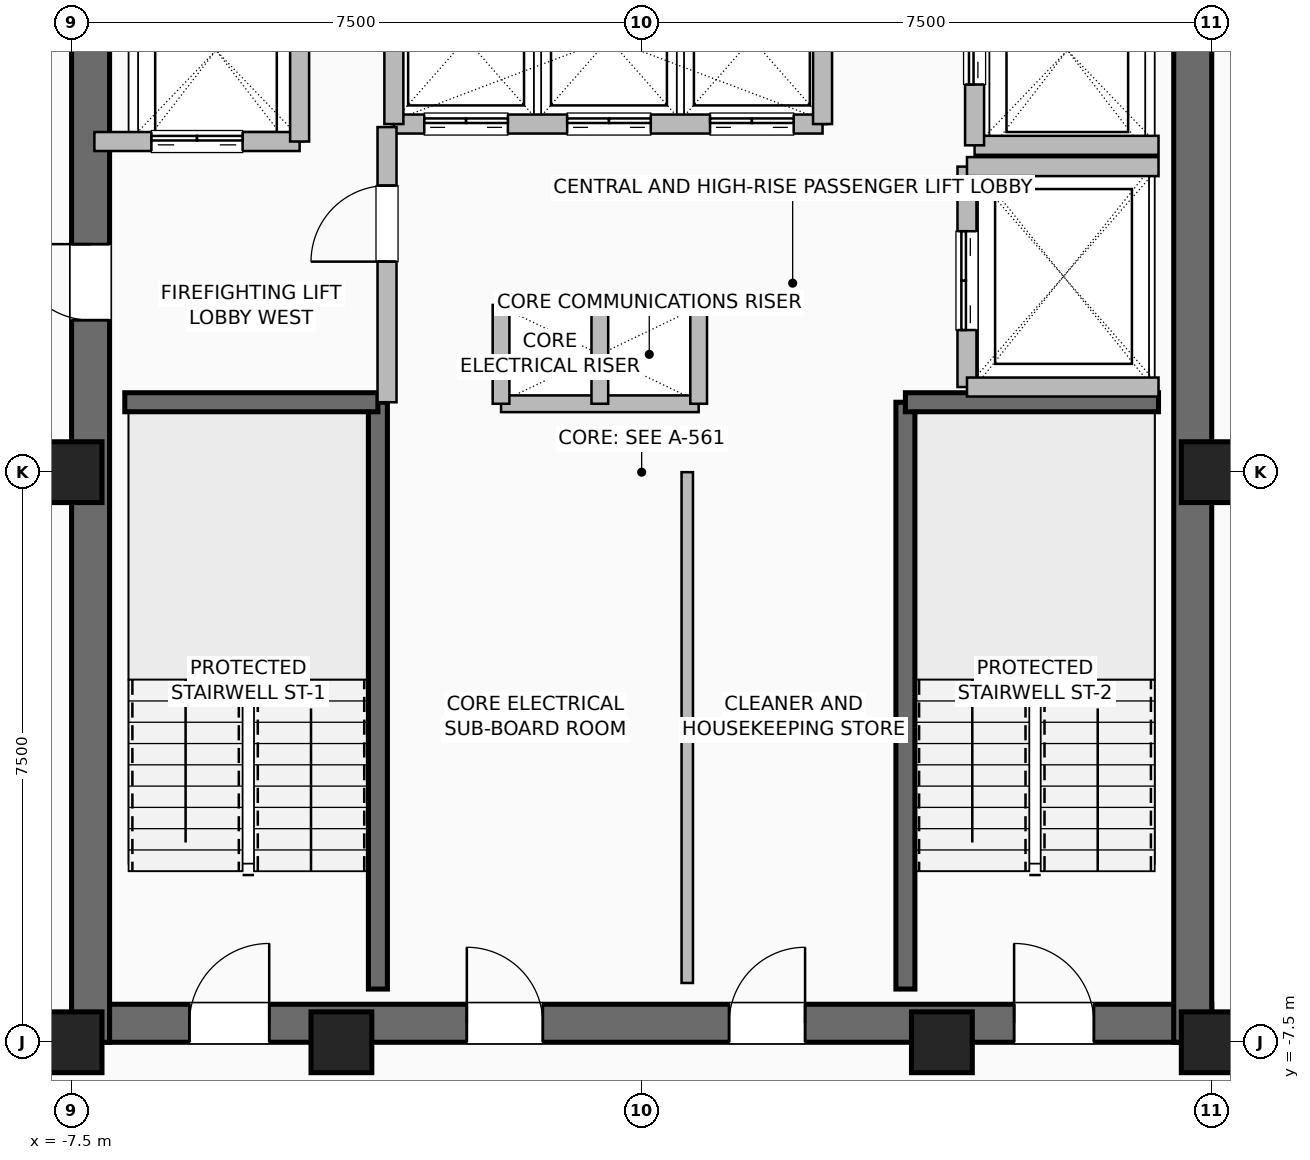
"""IFC4 building model, lengths in metres.
Left out: names, types, materials, properties, quantities, classifications, styles, units other than length and angle.
Written with IfcOpenShell. Run it as: python <this file> out.ifc"""

import sys

from ifc_helpers import new_model, si_unit, direction, frame, frame_2d, origin, origin_2d, place, context, subcontext, project, spatial, rectangle, hollow_rectangle, extrude, element, fill, save


model = new_model("IFC4")
c1 = context("Model", 3, precision=1e-05, world=origin(), true_north=direction((0.0, 1.0)))
c2 = subcontext(c1, "Body", "Model", "MODEL_VIEW")
j1 = project(units=[si_unit("LENGTHUNIT", "METRE"), si_unit("PLANEANGLEUNIT", "RADIAN")], contexts=[c1])
p1 = place(None, origin())
s1 = spatial("IfcSite", under=j1, at=p1, CompositionType="ELEMENT")
p2 = place(p1, origin())
s2 = spatial("IfcBuilding", under=s1, at=p2, CompositionType="ELEMENT")
p3 = place(p2, frame((0.0, 0.0, 246.8)))
s3 = spatial("IfcBuildingStorey", under=s2, at=p3, CompositionType="ELEMENT", Elevation=246.8)
for number, where, z_axis, x_axis in (
    (1, (-7.5, -7.5, 0.0), (0.0, 0.0, 1.0), (1.0, 0.0, 0.0)),
    (2, (-3.95, -7.5, 0.0), (0.0, 0.0, 1.0), (1.0, 0.0, 0.0)),
    (3, (3.95, -7.5, 0.0), (0.0, 0.0, 1.0), (1.0, 0.0, 0.0)),
    (4, (7.5, -7.5, 0.0), (0.0, 0.0, 1.0), (1.0, 0.0, 0.0)),
    (5, (7.5, 0.0, 0.0), (0.0, 0.0, 1.0), (1.0, 0.0, 0.0)),
    (6, (-7.5, 0.0, 0.0), (0.0, 0.0, 1.0), (1.0, 0.0, 0.0)),
):
    element("IfcColumn", number, at=place(p3, frame(where, z_axis=z_axis, x_axis=x_axis)), inside=s3, PredefinedType="COLUMN", context=c2, shape_type="SweptSolid", body=[
        extrude(hollow_rectangle(XDim=0.8, YDim=0.8, WallThickness=0.04, at=origin_2d()), origin(), (0.0, 0.0, 1.0), 3.6),
    ])
p4 = place(p3, frame((-7.5, -7.25, 0.0), z_axis=(0.0, 0.0, 1.0), x_axis=(1.0, 0.0, 0.0)))
e7 = element("IfcWall", 7, at=p4, inside=s3, PredefinedType="SHEAR", context=c2, shape_type="SweptSolid", body=[
    extrude(rectangle(XDim=15.0, YDim=0.5, at=frame_2d((7.5, 0.0))), origin(), (0.0, 0.0, 1.0), 3.36),
])
p5 = place(p4, frame((1.55, 0.0, 0.0)))
e8 = element("IfcOpeningElement", 8, at=p5, cuts=e7, PredefinedType="OPENING", context=c2, shape_type="SweptSolid", body=[
    extrude(rectangle(XDim=1.05, YDim=2.08, at=frame_2d((0.525, 1.04))), frame((0.0, 0.26, 0.0), z_axis=(0.0, -1.0, 0.0), x_axis=(1.0, 0.0, 0.0)), (0.0, 0.0, 1.0), 0.52),
])
p6 = place(p4, frame((12.4, 0.0, 0.0)))
e9 = element("IfcOpeningElement", 9, at=p6, cuts=e7, PredefinedType="OPENING", context=c2, shape_type="SweptSolid", body=[
    extrude(rectangle(XDim=1.05, YDim=2.08, at=frame_2d((0.525, 1.04))), frame((0.0, 0.26, 0.0), z_axis=(0.0, -1.0, 0.0), x_axis=(1.0, 0.0, 0.0)), (0.0, 0.0, 1.0), 0.52),
])
p7 = place(p4, frame((5.2, 0.0, 0.0)))
e10 = element("IfcOpeningElement", 10, at=p7, cuts=e7, PredefinedType="OPENING", context=c2, shape_type="SweptSolid", body=[
    extrude(rectangle(XDim=1.0, YDim=2.08, at=frame_2d((0.5, 1.04))), frame((0.0, 0.26, 0.0), z_axis=(0.0, -1.0, 0.0), x_axis=(1.0, 0.0, 0.0)), (0.0, 0.0, 1.0), 0.52),
])
p8 = place(p4, frame((8.65, 0.0, 0.0)))
e11 = element("IfcOpeningElement", 11, at=p8, cuts=e7, PredefinedType="OPENING", context=c2, shape_type="SweptSolid", body=[
    extrude(rectangle(XDim=1.0, YDim=2.08, at=frame_2d((0.5, 1.04))), frame((0.0, 0.26, 0.0), z_axis=(0.0, -1.0, 0.0), x_axis=(1.0, 0.0, 0.0)), (0.0, 0.0, 1.0), 0.52),
])
p9 = place(p3, frame((-7.25, -7.5, 0.0), z_axis=(0.0, 0.0, 1.0), x_axis=(0.0, 1.0, 0.0)))
e12 = element("IfcWall", 12, at=p9, inside=s3, PredefinedType="SHEAR", context=c2, shape_type="SweptSolid", body=[
    extrude(rectangle(XDim=15.0, YDim=0.5, at=frame_2d((7.5, 0.0))), origin(), (0.0, 0.0, 1.0), 3.36),
])
p10 = place(p9, frame((9.5, 0.0, 0.0)))
e13 = element("IfcOpeningElement", 13, at=p10, cuts=e12, PredefinedType="OPENING", context=c2, shape_type="SweptSolid", body=[
    extrude(rectangle(XDim=1.0, YDim=2.08, at=frame_2d((0.5, 1.04))), frame((0.0, 0.26, 0.0), z_axis=(0.0, -1.0, 0.0), x_axis=(1.0, 0.0, 0.0)), (0.0, 0.0, 1.0), 0.52),
])
p11 = place(p3, frame((7.25, -7.5, 0.0), z_axis=(0.0, 0.0, 1.0), x_axis=(0.0, 1.0, 0.0)))
e14 = element("IfcWall", 14, at=p11, inside=s3, PredefinedType="SHEAR", context=c2, shape_type="SweptSolid", body=[
    extrude(rectangle(XDim=15.0, YDim=0.5, at=frame_2d((7.5, 0.0))), origin(), (0.0, 0.0, 1.0), 3.36),
])
p12 = place(p3, frame((-3.47, -6.8, 0.0), z_axis=(0.0, 0.0, 1.0), x_axis=(0.0, 1.0, 0.0)))
e15 = element("IfcWall", 15, at=p12, inside=s3, PredefinedType="SHEAR", context=c2, shape_type="SweptSolid", body=[
    extrude(rectangle(XDim=7.72, YDim=0.25, at=frame_2d((3.86, 0.0))), origin(), (0.0, 0.0, 1.0), 3.36),
])
p13 = place(p3, frame((-6.8, 0.92, 0.0), z_axis=(0.0, 0.0, 1.0), x_axis=(1.0, 0.0, 0.0)))
e16 = element("IfcWall", 16, at=p13, inside=s3, PredefinedType="SHEAR", context=c2, shape_type="SweptSolid", body=[
    extrude(rectangle(XDim=3.33, YDim=0.25, at=frame_2d((1.665, 0.0))), origin(), (0.0, 0.0, 1.0), 3.36),
])
p14 = place(p3, frame((3.47, -6.8, 0.0), z_axis=(0.0, 0.0, 1.0), x_axis=(0.0, 1.0, 0.0)))
e17 = element("IfcWall", 17, at=p14, inside=s3, PredefinedType="SHEAR", context=c2, shape_type="SweptSolid", body=[
    extrude(rectangle(XDim=7.72, YDim=0.25, at=frame_2d((3.86, 0.0))), origin(), (0.0, 0.0, 1.0), 3.36),
])
p15 = place(p3, frame((3.47, 0.92, 0.0), z_axis=(0.0, 0.0, 1.0), x_axis=(1.0, 0.0, 0.0)))
e18 = element("IfcWall", 18, at=p15, inside=s3, PredefinedType="SHEAR", context=c2, shape_type="SweptSolid", body=[
    extrude(rectangle(XDim=3.33, YDim=0.25, at=frame_2d((1.665, 0.0))), origin(), (0.0, 0.0, 1.0), 3.36),
])
for number, where, z_axis, x_axis in (
    (19, (-1.85, 2.2, 0.0), (0.0, 0.0, 1.0), (1.0, 0.0, 0.0)),
    (20, (-1.85, 0.9, 0.0), (0.0, 0.0, 1.0), (1.0, 0.0, 0.0)),
):
    element("IfcWall", number, at=place(p3, frame(where, z_axis=z_axis, x_axis=x_axis)), inside=s3, PredefinedType="PARTITIONING", context=c2, shape_type="SweptSolid", body=[
        extrude(rectangle(XDim=2.6, YDim=0.22, at=frame_2d((1.3, 0.0))), origin(), (0.0, 0.0, 1.0), 3.36),
    ])
for number, where, z_axis, x_axis in (
    (21, (-0.55, 0.9, 0.0), (0.0, 0.0, 1.0), (0.0, 1.0, 0.0)),
    (22, (0.75, 0.9, 0.0), (0.0, 0.0, 1.0), (0.0, 1.0, 0.0)),
    (23, (-1.85, 0.9, 0.0), (0.0, 0.0, 1.0), (0.0, 1.0, 0.0)),
):
    element("IfcWall", number, at=place(p3, frame(where, z_axis=z_axis, x_axis=x_axis)), inside=s3, PredefinedType="PARTITIONING", context=c2, shape_type="SweptSolid", body=[
        extrude(rectangle(XDim=1.3, YDim=0.22, at=frame_2d((0.65, 0.0))), origin(), (0.0, 0.0, 1.0), 3.36),
    ])
p16 = place(p3, frame((-3.26, 4.58, 0.0), z_axis=(0.0, 0.0, 1.0), x_axis=(1.0, 0.0, 0.0)))
e24 = element("IfcWall", 24, at=p16, inside=s3, PredefinedType="SHEAR", context=c2, shape_type="SweptSolid", body=[
    extrude(rectangle(XDim=5.64, YDim=0.25, at=frame_2d((2.82, 0.0))), origin(), (0.0, 0.0, 1.0), 3.36),
])
p17 = place(p16, frame((0.4, 0.0, 0.0)))
e25 = element("IfcOpeningElement", 25, at=p17, cuts=e24, PredefinedType="OPENING", context=c2, shape_type="SweptSolid", body=[
    extrude(rectangle(XDim=1.1, YDim=2.2, at=frame_2d((0.55, 1.1))), frame((0.0, 0.135, 0.0), z_axis=(0.0, -1.0, 0.0), x_axis=(1.0, 0.0, 0.0)), (0.0, 0.0, 1.0), 0.27),
])
p18 = place(p16, frame((2.28, 0.0, 0.0)))
e26 = element("IfcOpeningElement", 26, at=p18, cuts=e24, PredefinedType="OPENING", context=c2, shape_type="SweptSolid", body=[
    extrude(rectangle(XDim=1.1, YDim=2.2, at=frame_2d((0.55, 1.1))), frame((0.0, 0.135, 0.0), z_axis=(0.0, -1.0, 0.0), x_axis=(1.0, 0.0, 0.0)), (0.0, 0.0, 1.0), 0.27),
])
p19 = place(p16, frame((4.16, 0.0, 0.0)))
e27 = element("IfcOpeningElement", 27, at=p19, cuts=e24, PredefinedType="OPENING", context=c2, shape_type="SweptSolid", body=[
    extrude(rectangle(XDim=1.1, YDim=2.2, at=frame_2d((0.55, 1.1))), frame((0.0, 0.135, 0.0), z_axis=(0.0, -1.0, 0.0), x_axis=(1.0, 0.0, 0.0)), (0.0, 0.0, 1.0), 0.27),
])
for number, where, z_axis, x_axis in (
    (28, (-3.26, 4.58, 0.0), (0.0, 0.0, 1.0), (0.0, 1.0, 0.0)),
    (29, (2.38, 4.58, 0.0), (0.0, 0.0, 1.0), (0.0, 1.0, 0.0)),
):
    element("IfcWall", number, at=place(p3, frame(where, z_axis=z_axis, x_axis=x_axis)), inside=s3, PredefinedType="SHEAR", context=c2, shape_type="SweptSolid", body=[
        extrude(rectangle(XDim=2.22, YDim=0.25, at=frame_2d((1.11, 0.0))), origin(), (0.0, 0.0, 1.0), 3.36),
    ])
p20 = place(p3, frame((-7.2, 4.35, 0.0), z_axis=(0.0, 0.0, 1.0), x_axis=(1.0, 0.0, 0.0)))
e30 = element("IfcWall", 30, at=p20, inside=s3, PredefinedType="SHEAR", context=c2, shape_type="SweptSolid", body=[
    extrude(rectangle(XDim=2.7, YDim=0.25, at=frame_2d((1.35, 0.0))), origin(), (0.0, 0.0, 1.0), 3.36),
])
p21 = place(p20, frame((0.75, 0.0, 0.0)))
e31 = element("IfcOpeningElement", 31, at=p21, cuts=e30, PredefinedType="OPENING", context=c2, shape_type="SweptSolid", body=[
    extrude(rectangle(XDim=1.2, YDim=2.2, at=frame_2d((0.6, 1.1))), frame((0.0, 0.135, 0.0), z_axis=(0.0, -1.0, 0.0), x_axis=(1.0, 0.0, 0.0)), (0.0, 0.0, 1.0), 0.27),
])
p22 = place(p3, frame((-4.5, 4.35, 0.0), z_axis=(0.0, 0.0, 1.0), x_axis=(0.0, 1.0, 0.0)))
e32 = element("IfcWall", 32, at=p22, inside=s3, PredefinedType="SHEAR", context=c2, shape_type="SweptSolid", body=[
    extrude(rectangle(XDim=2.85, YDim=0.25, at=frame_2d((1.425, 0.0))), origin(), (0.0, 0.0, 1.0), 3.36),
])
p23 = place(p3, frame((4.38, 4.3, 0.0), z_axis=(0.0, 0.0, 1.0), x_axis=(1.0, 0.0, 0.0)))
e33 = element("IfcWall", 33, at=p23, inside=s3, PredefinedType="SHEAR", context=c2, shape_type="SweptSolid", body=[
    extrude(rectangle(XDim=2.42, YDim=0.25, at=frame_2d((1.21, 0.0))), origin(), (0.0, 0.0, 1.0), 3.36),
])
p24 = place(p3, frame((4.38, 4.3, 0.0), z_axis=(0.0, 0.0, 1.0), x_axis=(0.0, 1.0, 0.0)))
e34 = element("IfcWall", 34, at=p24, inside=s3, PredefinedType="SHEAR", context=c2, shape_type="SweptSolid", body=[
    extrude(rectangle(XDim=2.5, YDim=0.25, at=frame_2d((1.25, 0.0))), origin(), (0.0, 0.0, 1.0), 3.36),
])
p25 = place(p24, frame((0.8, 0.0, 0.0)))
e35 = element("IfcOpeningElement", 35, at=p25, cuts=e34, PredefinedType="OPENING", context=c2, shape_type="SweptSolid", body=[
    extrude(rectangle(XDim=1.2, YDim=2.2, at=frame_2d((0.6, 1.1))), frame((0.0, 0.135, 0.0), z_axis=(0.0, -1.0, 0.0), x_axis=(1.0, 0.0, 0.0)), (0.0, 0.0, 1.0), 0.27),
])
p26 = place(p3, frame((4.28, 1.12, 0.0), z_axis=(0.0, 0.0, 1.0), x_axis=(0.0, 1.0, 0.0)))
e36 = element("IfcWall", 36, at=p26, inside=s3, PredefinedType="SHEAR", context=c2, shape_type="SweptSolid", body=[
    extrude(rectangle(XDim=2.9, YDim=0.25, at=frame_2d((1.45, 0.0))), origin(), (0.0, 0.0, 1.0), 3.36),
])
p27 = place(p26, frame((0.75, 0.0, 0.0)))
e37 = element("IfcOpeningElement", 37, at=p27, cuts=e36, PredefinedType="OPENING", context=c2, shape_type="SweptSolid", body=[
    extrude(rectangle(XDim=1.3, YDim=2.3, at=frame_2d((0.65, 1.15))), frame((0.0, 0.135, 0.0), z_axis=(0.0, -1.0, 0.0), x_axis=(1.0, 0.0, 0.0)), (0.0, 0.0, 1.0), 0.27),
])
for number, where, z_axis, x_axis in (
    (38, (4.28, 1.12, 0.0), (0.0, 0.0, 1.0), (1.0, 0.0, 0.0)),
    (39, (4.28, 4.02, 0.0), (0.0, 0.0, 1.0), (1.0, 0.0, 0.0)),
):
    element("IfcWall", number, at=place(p3, frame(where, z_axis=z_axis, x_axis=x_axis)), inside=s3, PredefinedType="SHEAR", context=c2, shape_type="SweptSolid", body=[
        extrude(rectangle(XDim=2.52, YDim=0.25, at=frame_2d((1.26, 0.0))), origin(), (0.0, 0.0, 1.0), 3.36),
    ])
p28 = place(p3, frame((-3.35, 0.92, 0.0), z_axis=(0.0, 0.0, 1.0), x_axis=(0.0, 1.0, 0.0)))
e40 = element("IfcWall", 40, at=p28, inside=s3, PredefinedType="SHEAR", context=c2, shape_type="SweptSolid", body=[
    extrude(rectangle(XDim=3.62, YDim=0.25, at=frame_2d((1.81, 0.0))), origin(), (0.0, 0.0, 1.0), 3.36),
])
p29 = place(p28, frame((1.85, 0.0, 0.0)))
e41 = element("IfcOpeningElement", 41, at=p29, cuts=e40, PredefinedType="OPENING", context=c2, shape_type="SweptSolid", body=[
    extrude(rectangle(XDim=1.0, YDim=2.08, at=frame_2d((0.5, 1.04))), frame((0.0, 0.135, 0.0), z_axis=(0.0, -1.0, 0.0), x_axis=(1.0, 0.0, 0.0)), (0.0, 0.0, 1.0), 0.27),
])
p30 = place(p3, frame((0.6, -6.72, 0.0), z_axis=(0.0, 0.0, 1.0), x_axis=(0.0, 1.0, 0.0)))
e42 = element("IfcWall", 42, at=p30, inside=s3, PredefinedType="PARTITIONING", context=c2, shape_type="SweptSolid", body=[
    extrude(rectangle(XDim=6.72, YDim=0.15, at=frame_2d((3.36, 0.0))), origin(), (0.0, 0.0, 1.0), 3.36),
])
p31 = place(p3, frame((7.45, -7.48, 0.0), z_axis=(0.0, 0.0, 1.0), x_axis=(1.0, 0.0, 0.0)))
e43 = element("IfcWall", 43, at=p31, inside=s3, PredefinedType="PARTITIONING", context=c2, shape_type="SweptSolid", body=[
    extrude(rectangle(XDim=0.95, YDim=0.15, at=frame_2d((0.475, 0.0))), origin(), (0.0, 0.0, 1.0), 3.36),
])
p32 = place(p5, origin())
e44 = element("IfcDoor", 44, at=p32, inside=s3, OperationType="SINGLE_SWING_RIGHT", PredefinedType="DOOR", context=c2, shape_type="SweptSolid", body=[
    extrude(rectangle(XDim=1.05, YDim=2.08, at=frame_2d((0.525, 1.04))), frame((0.0, 0.025, 0.0), z_axis=(0.0, -1.0, 0.0), x_axis=(1.0, 0.0, 0.0)), (0.0, 0.0, 1.0), 0.05),
])
fill(e8, e44)
p33 = place(p6, origin())
e45 = element("IfcDoor", 45, at=p33, inside=s3, OperationType="SINGLE_SWING_LEFT", PredefinedType="DOOR", context=c2, shape_type="SweptSolid", body=[
    extrude(rectangle(XDim=1.05, YDim=2.08, at=frame_2d((0.525, 1.04))), frame((0.0, 0.025, 0.0), z_axis=(0.0, -1.0, 0.0), x_axis=(1.0, 0.0, 0.0)), (0.0, 0.0, 1.0), 0.05),
])
fill(e9, e45)
p34 = place(p10, origin())
e46 = element("IfcDoor", 46, at=p34, inside=s3, OperationType="SINGLE_SWING_RIGHT", PredefinedType="DOOR", context=c2, shape_type="SweptSolid", body=[
    extrude(rectangle(XDim=1.0, YDim=2.08, at=frame_2d((0.5, 1.04))), frame((0.0, 0.025, 0.0), z_axis=(0.0, -1.0, 0.0), x_axis=(1.0, 0.0, 0.0)), (0.0, 0.0, 1.0), 0.05),
])
fill(e13, e46)
p35 = place(p7, origin())
e47 = element("IfcDoor", 47, at=p35, inside=s3, OperationType="SINGLE_SWING_LEFT", PredefinedType="DOOR", context=c2, shape_type="SweptSolid", body=[
    extrude(rectangle(XDim=1.0, YDim=2.08, at=frame_2d((0.5, 1.04))), frame((0.0, 0.025, 0.0), z_axis=(0.0, -1.0, 0.0), x_axis=(1.0, 0.0, 0.0)), (0.0, 0.0, 1.0), 0.05),
])
fill(e10, e47)
p36 = place(p8, origin())
e48 = element("IfcDoor", 48, at=p36, inside=s3, OperationType="SINGLE_SWING_RIGHT", PredefinedType="DOOR", context=c2, shape_type="SweptSolid", body=[
    extrude(rectangle(XDim=1.0, YDim=2.08, at=frame_2d((0.5, 1.04))), frame((0.0, 0.025, 0.0), z_axis=(0.0, -1.0, 0.0), x_axis=(1.0, 0.0, 0.0)), (0.0, 0.0, 1.0), 0.05),
])
fill(e11, e48)
p37 = place(p17, origin())
e49 = element("IfcDoor", 49, at=p37, inside=s3, OperationType="DOUBLE_DOOR_SLIDING", PredefinedType="DOOR", context=c2, shape_type="SweptSolid", body=[
    extrude(rectangle(XDim=1.1, YDim=2.2, at=frame_2d((0.55, 1.1))), frame((0.0, 0.025, 0.0), z_axis=(0.0, -1.0, 0.0), x_axis=(1.0, 0.0, 0.0)), (0.0, 0.0, 1.0), 0.05),
])
fill(e25, e49)
p38 = place(p18, origin())
e50 = element("IfcDoor", 50, at=p38, inside=s3, OperationType="DOUBLE_DOOR_SLIDING", PredefinedType="DOOR", context=c2, shape_type="SweptSolid", body=[
    extrude(rectangle(XDim=1.1, YDim=2.2, at=frame_2d((0.55, 1.1))), frame((0.0, 0.025, 0.0), z_axis=(0.0, -1.0, 0.0), x_axis=(1.0, 0.0, 0.0)), (0.0, 0.0, 1.0), 0.05),
])
fill(e26, e50)
p39 = place(p19, origin())
e51 = element("IfcDoor", 51, at=p39, inside=s3, OperationType="DOUBLE_DOOR_SLIDING", PredefinedType="DOOR", context=c2, shape_type="SweptSolid", body=[
    extrude(rectangle(XDim=1.1, YDim=2.2, at=frame_2d((0.55, 1.1))), frame((0.0, 0.025, 0.0), z_axis=(0.0, -1.0, 0.0), x_axis=(1.0, 0.0, 0.0)), (0.0, 0.0, 1.0), 0.05),
])
fill(e27, e51)
p40 = place(p21, origin())
e52 = element("IfcDoor", 52, at=p40, inside=s3, OperationType="DOUBLE_DOOR_SLIDING", PredefinedType="DOOR", context=c2, shape_type="SweptSolid", body=[
    extrude(rectangle(XDim=1.2, YDim=2.2, at=frame_2d((0.6, 1.1))), frame((0.0, 0.025, 0.0), z_axis=(0.0, -1.0, 0.0), x_axis=(1.0, 0.0, 0.0)), (0.0, 0.0, 1.0), 0.05),
])
fill(e31, e52)
p41 = place(p25, origin())
e53 = element("IfcDoor", 53, at=p41, inside=s3, OperationType="DOUBLE_DOOR_SLIDING", PredefinedType="DOOR", context=c2, shape_type="SweptSolid", body=[
    extrude(rectangle(XDim=1.2, YDim=2.2, at=frame_2d((0.6, 1.1))), frame((0.0, 0.025, 0.0), z_axis=(0.0, -1.0, 0.0), x_axis=(1.0, 0.0, 0.0)), (0.0, 0.0, 1.0), 0.05),
])
fill(e35, e53)
p42 = place(p27, origin())
e54 = element("IfcDoor", 54, at=p42, inside=s3, OperationType="DOUBLE_DOOR_SLIDING", PredefinedType="DOOR", context=c2, shape_type="SweptSolid", body=[
    extrude(rectangle(XDim=1.3, YDim=2.3, at=frame_2d((0.65, 1.15))), frame((0.0, 0.025, 0.0), z_axis=(0.0, -1.0, 0.0), x_axis=(1.0, 0.0, 0.0)), (0.0, 0.0, 1.0), 0.05),
])
fill(e37, e54)
p43 = place(p29, origin())
e55 = element("IfcDoor", 55, at=p43, inside=s3, OperationType="SINGLE_SWING_LEFT", PredefinedType="DOOR", context=c2, shape_type="SweptSolid", body=[
    extrude(rectangle(XDim=1.0, YDim=2.08, at=frame_2d((0.5, 1.04))), frame((0.0, 0.025, 0.0), z_axis=(0.0, -1.0, 0.0), x_axis=(1.0, 0.0, 0.0)), (0.0, 0.0, 1.0), 0.05),
])
fill(e41, e55)
save(model, sys.argv[1])
